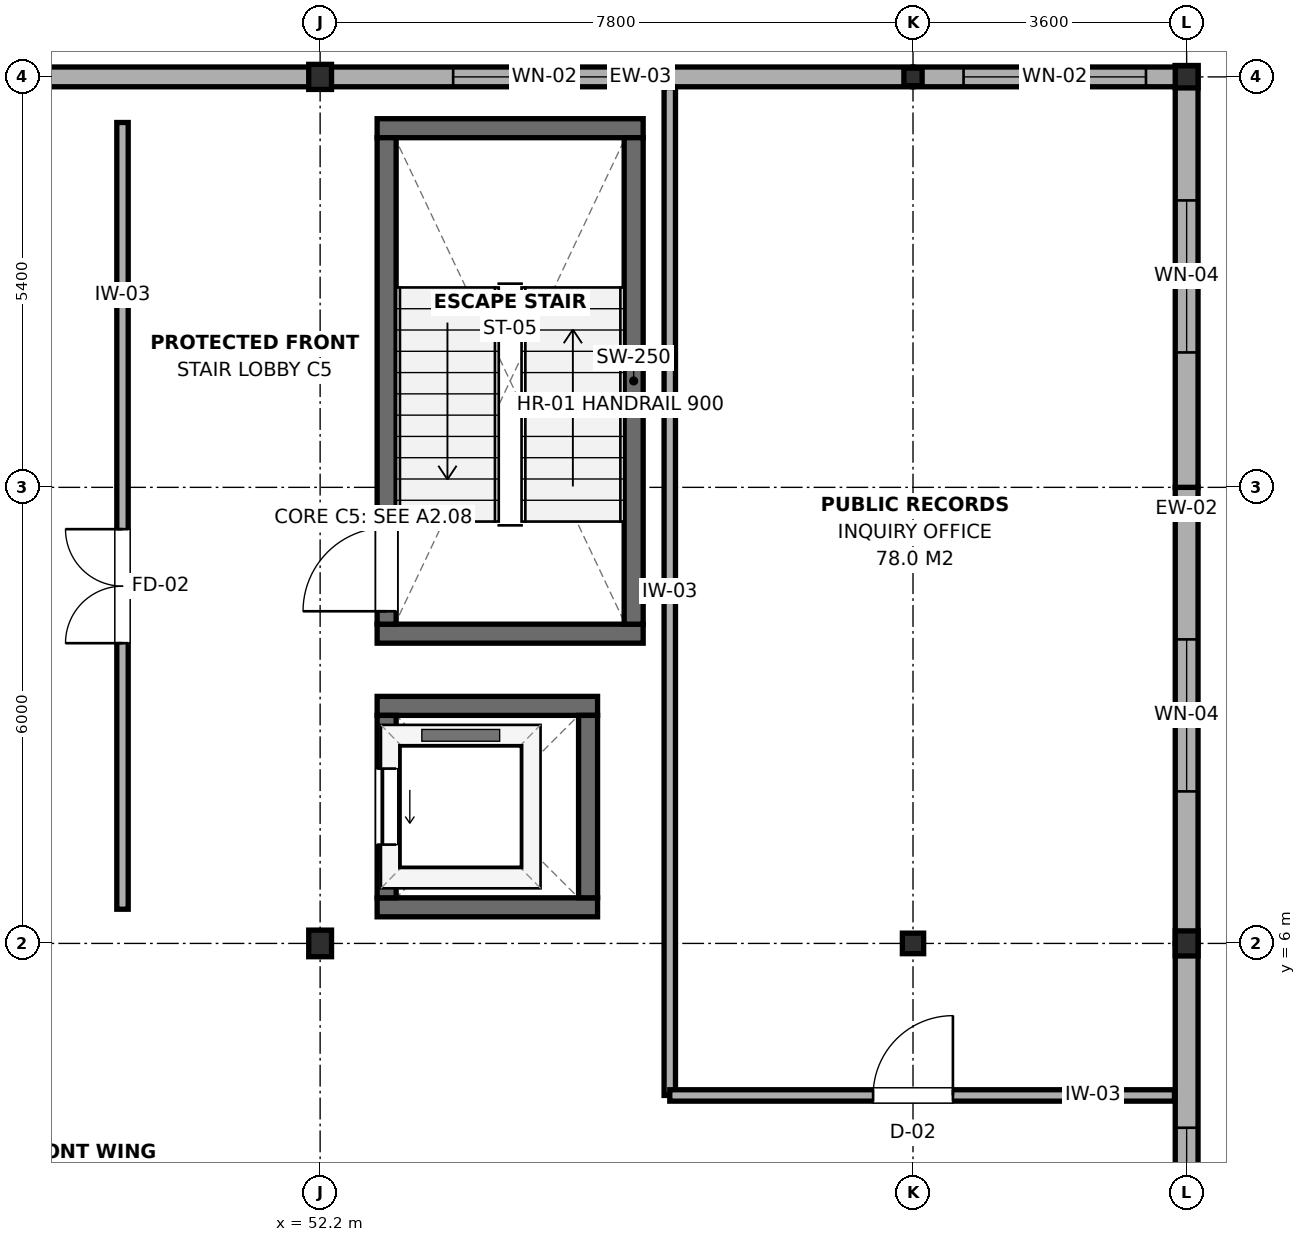
"""IFC4 building model, lengths in metres.
Left out: names, types, materials, properties, quantities, classifications, styles, units other than length and angle.
Written with IfcOpenShell. Run it as: python <this file> out.ifc"""

import sys

from ifc_helpers import new_model, si_unit, direction, frame, frame_2d, origin, origin_2d, place, context, subcontext, project, spatial, rectangle, i_section, extrude, element, fill, save


model = new_model("IFC4")
c1 = context("Model", 3, precision=1e-05, world=origin(), true_north=direction((0.0, 1.0)))
c2 = subcontext(c1, "Body", "Model", "MODEL_VIEW")
j1 = project(units=[si_unit("LENGTHUNIT", "METRE"), si_unit("PLANEANGLEUNIT", "RADIAN")], contexts=[c1])
p1 = place(None, origin())
s1 = spatial("IfcSite", under=j1, at=p1, CompositionType="ELEMENT")
p2 = place(p1, origin())
s2 = spatial("IfcBuilding", under=s1, at=p2, CompositionType="ELEMENT")
p3 = place(p2, frame((0.0, 0.0, 4.8)))
s3 = spatial("IfcBuildingStorey", under=s2, at=p3, CompositionType="ELEMENT", Elevation=4.8)
p4 = place(p3, frame((52.2, 6.0, 0.0), z_axis=(0.0, 0.0, 1.0), x_axis=(1.0, 0.0, 0.0)))
e1 = element("IfcColumn", 1, at=p4, inside=s3, PredefinedType="COLUMN", context=c2, shape_type="SweptSolid", body=[
    extrude(i_section(OverallWidth=0.3, OverallDepth=0.35, WebThickness=0.01, FlangeThickness=0.018, FilletRadius=0.027, at=origin_2d()), origin(), (0.0, 0.0, 1.0), 3.98),
])
p5 = place(p3, frame((52.2, 17.4, 0.0), z_axis=(0.0, 0.0, 1.0), x_axis=(1.0, 0.0, 0.0)))
e2 = element("IfcColumn", 2, at=p5, inside=s3, PredefinedType="COLUMN", context=c2, shape_type="SweptSolid", body=[
    extrude(i_section(OverallWidth=0.3, OverallDepth=0.33, WebThickness=0.01, FlangeThickness=0.017, FilletRadius=0.027, at=origin_2d()), origin(), (0.0, 0.0, 1.0), 3.98),
])
p6 = place(p3, frame((60.0, 6.0, 0.0), z_axis=(0.0, 0.0, 1.0), x_axis=(1.0, 0.0, 0.0)))
e3 = element("IfcColumn", 3, at=p6, inside=s3, PredefinedType="COLUMN", context=c2, shape_type="SweptSolid", body=[
    extrude(i_section(OverallWidth=0.28, OverallDepth=0.27, WebThickness=0.008, FlangeThickness=0.013, FilletRadius=0.024, at=origin_2d()), origin(), (0.0, 0.0, 1.0), 3.98),
])
p7 = place(p3, frame((60.0, 17.4, 0.0), z_axis=(0.0, 0.0, 1.0), x_axis=(1.0, 0.0, 0.0)))
e4 = element("IfcColumn", 4, at=p7, inside=s3, PredefinedType="COLUMN", context=c2, shape_type="SweptSolid", body=[
    extrude(i_section(OverallWidth=0.24, OverallDepth=0.23, WebThickness=0.008, FlangeThickness=0.012, FilletRadius=0.021, at=origin_2d()), origin(), (0.0, 0.0, 1.0), 3.98),
])
p8 = place(p3, frame((63.6, 6.0, 0.0), z_axis=(0.0, 0.0, 1.0), x_axis=(1.0, 0.0, 0.0)))
e5 = element("IfcColumn", 5, at=p8, inside=s3, PredefinedType="COLUMN", context=c2, shape_type="SweptSolid", body=[
    extrude(i_section(OverallWidth=0.3, OverallDepth=0.33, WebThickness=0.01, FlangeThickness=0.017, FilletRadius=0.027, at=origin_2d()), origin(), (0.0, 0.0, 1.0), 3.98),
])
p9 = place(p3, frame((63.6, 17.4, 0.0), z_axis=(0.0, 0.0, 1.0), x_axis=(1.0, 0.0, 0.0)))
e6 = element("IfcColumn", 6, at=p9, inside=s3, PredefinedType="COLUMN", context=c2, shape_type="SweptSolid", body=[
    extrude(i_section(OverallWidth=0.3, OverallDepth=0.29, WebThickness=0.009, FlangeThickness=0.014, FilletRadius=0.027, at=origin_2d()), origin(), (0.0, 0.0, 1.0), 3.98),
])
for number, where, z_axis, x_axis in (
    (7, (52.95, 10.075, 0.0), (0.0, 0.0, 1.0), (1.0, 0.0, 0.0)),
    (8, (52.95, 16.725, 0.0), (0.0, 0.0, 1.0), (1.0, 0.0, 0.0)),
):
    element("IfcWall", number, at=place(p3, frame(where, z_axis=z_axis, x_axis=x_axis)), inside=s3, PredefinedType="SHEAR", context=c2, shape_type="SweptSolid", body=[
        extrude(rectangle(XDim=3.5, YDim=0.25, at=frame_2d((1.75, 0.0))), origin(), (0.0, 0.0, 1.0), 3.98),
    ])
p10 = place(p3, frame((53.075, 10.2, 0.0), z_axis=(0.0, 0.0, 1.0), x_axis=(0.0, 1.0, 0.0)))
e9 = element("IfcWall", 9, at=p10, inside=s3, PredefinedType="SHEAR", context=c2, shape_type="SweptSolid", body=[
    extrude(rectangle(XDim=6.4, YDim=0.25, at=frame_2d((3.2, 0.0))), origin(), (0.0, 0.0, 1.0), 3.98),
])
p11 = place(p10, frame((0.17, 0.0, 0.0)))
e10 = element("IfcOpeningElement", 10, at=p11, cuts=e9, PredefinedType="OPENING", context=c2, shape_type="SweptSolid", body=[
    extrude(rectangle(XDim=1.1, YDim=2.15, at=frame_2d((0.55, 1.075))), frame((0.0, 0.14, 0.0), z_axis=(0.0, -1.0, 0.0), x_axis=(1.0, 0.0, 0.0)), (0.0, 0.0, 1.0), 0.28),
])
p12 = place(p3, frame((56.325, 10.2, 0.0), z_axis=(0.0, 0.0, 1.0), x_axis=(0.0, 1.0, 0.0)))
e11 = element("IfcWall", 11, at=p12, inside=s3, PredefinedType="SHEAR", context=c2, shape_type="SweptSolid", body=[
    extrude(rectangle(XDim=6.4, YDim=0.25, at=frame_2d((3.2, 0.0))), origin(), (0.0, 0.0, 1.0), 3.98),
])
for number, where, z_axis, x_axis in (
    (12, (52.95, 6.475, 0.0), (0.0, 0.0, 1.0), (1.0, 0.0, 0.0)),
    (13, (52.95, 9.125, 0.0), (0.0, 0.0, 1.0), (1.0, 0.0, 0.0)),
):
    element("IfcWall", number, at=place(p3, frame(where, z_axis=z_axis, x_axis=x_axis)), inside=s3, PredefinedType="SHEAR", context=c2, shape_type="SweptSolid", body=[
        extrude(rectangle(XDim=2.9, YDim=0.25, at=frame_2d((1.45, 0.0))), origin(), (0.0, 0.0, 1.0), 3.98),
    ])
p13 = place(p3, frame((53.075, 6.6, 0.0), z_axis=(0.0, 0.0, 1.0), x_axis=(0.0, 1.0, 0.0)))
e14 = element("IfcWall", 14, at=p13, inside=s3, PredefinedType="SHEAR", context=c2, shape_type="SweptSolid", body=[
    extrude(rectangle(XDim=2.4, YDim=0.25, at=frame_2d((1.2, 0.0))), origin(), (0.0, 0.0, 1.0), 3.98),
])
p14 = place(p13, frame((0.7, 0.0, 0.0)))
e15 = element("IfcOpeningElement", 15, at=p14, cuts=e14, PredefinedType="OPENING", context=c2, shape_type="SweptSolid", body=[
    extrude(rectangle(XDim=1.0, YDim=2.15, at=frame_2d((0.5, 1.075))), frame((0.0, 0.14, 0.0), z_axis=(0.0, -1.0, 0.0), x_axis=(1.0, 0.0, 0.0)), (0.0, 0.0, 1.0), 0.28),
])
p15 = place(p3, frame((55.725, 6.6, 0.0), z_axis=(0.0, 0.0, 1.0), x_axis=(0.0, 1.0, 0.0)))
e16 = element("IfcWall", 16, at=p15, inside=s3, PredefinedType="SHEAR", context=c2, shape_type="SweptSolid", body=[
    extrude(rectangle(XDim=2.4, YDim=0.25, at=frame_2d((1.2, 0.0))), origin(), (0.0, 0.0, 1.0), 3.98),
])
p16 = place(p3, frame((63.6, 1.05, 0.0), z_axis=(0.0, 0.0, 1.0), x_axis=(0.0, 1.0, 0.0)))
e17 = element("IfcWall", 17, at=p16, inside=s3, PredefinedType="SOLIDWALL", context=c2, shape_type="SweptSolid", body=[
    extrude(rectangle(XDim=4.95, YDim=0.3, at=frame_2d((2.475, 0.0))), origin(), (0.0, 0.0, 1.0), 3.385),
])
p17 = place(p16, frame((0.525, 0.0, 0.9)))
e18 = element("IfcOpeningElement", 18, at=p17, cuts=e17, PredefinedType="OPENING", context=c2, shape_type="SweptSolid", body=[
    extrude(rectangle(XDim=2.0, YDim=1.8, at=frame_2d((1.0, 0.9))), frame((0.0, 0.165, 0.0), z_axis=(0.0, -1.0, 0.0), x_axis=(1.0, 0.0, 0.0)), (0.0, 0.0, 1.0), 0.33),
])
p18 = place(p3, frame((63.6, 6.0, 0.0), z_axis=(0.0, 0.0, 1.0), x_axis=(0.0, 1.0, 0.0)))
e19 = element("IfcWall", 19, at=p18, inside=s3, PredefinedType="SOLIDWALL", context=c2, shape_type="SweptSolid", body=[
    extrude(rectangle(XDim=6.0, YDim=0.3, at=frame_2d((3.0, 0.0))), origin(), (0.0, 0.0, 1.0), 3.385),
])
p19 = place(p18, frame((2.0, 0.0, 0.9)))
e20 = element("IfcOpeningElement", 20, at=p19, cuts=e19, PredefinedType="OPENING", context=c2, shape_type="SweptSolid", body=[
    extrude(rectangle(XDim=2.0, YDim=1.8, at=frame_2d((1.0, 0.9))), frame((0.0, 0.165, 0.0), z_axis=(0.0, -1.0, 0.0), x_axis=(1.0, 0.0, 0.0)), (0.0, 0.0, 1.0), 0.33),
])
p20 = place(p3, frame((63.6, 12.0, 0.0), z_axis=(0.0, 0.0, 1.0), x_axis=(0.0, 1.0, 0.0)))
e21 = element("IfcWall", 21, at=p20, inside=s3, PredefinedType="SOLIDWALL", context=c2, shape_type="SweptSolid", body=[
    extrude(rectangle(XDim=5.55, YDim=0.3, at=frame_2d((2.775, 0.0))), origin(), (0.0, 0.0, 1.0), 3.385),
])
p21 = place(p20, frame((1.775, 0.0, 0.9)))
e22 = element("IfcOpeningElement", 22, at=p21, cuts=e21, PredefinedType="OPENING", context=c2, shape_type="SweptSolid", body=[
    extrude(rectangle(XDim=2.0, YDim=1.8, at=frame_2d((1.0, 0.9))), frame((0.0, 0.165, 0.0), z_axis=(0.0, -1.0, 0.0), x_axis=(1.0, 0.0, 0.0)), (0.0, 0.0, 1.0), 0.33),
])
p22 = place(p3, frame((46.2, 17.4, 0.0), z_axis=(0.0, 0.0, 1.0), x_axis=(1.0, 0.0, 0.0)))
e23 = element("IfcWall", 23, at=p22, inside=s3, PredefinedType="SOLIDWALL", context=c2, shape_type="SweptSolid", body=[
    extrude(rectangle(XDim=6.0, YDim=0.26, at=frame_2d((3.0, 0.0))), origin(), (0.0, 0.0, 1.0), 3.375),
])
p23 = place(p3, frame((52.2, 17.4, 0.0), z_axis=(0.0, 0.0, 1.0), x_axis=(1.0, 0.0, 0.0)))
e24 = element("IfcWall", 24, at=p23, inside=s3, PredefinedType="SOLIDWALL", context=c2, shape_type="SweptSolid", body=[
    extrude(rectangle(XDim=7.8, YDim=0.26, at=frame_2d((3.9, 0.0))), origin(), (0.0, 0.0, 1.0), 3.375),
])
p24 = place(p23, frame((1.75, 0.0, 0.9)))
e25 = element("IfcOpeningElement", 25, at=p24, cuts=e24, PredefinedType="OPENING", context=c2, shape_type="SweptSolid", body=[
    extrude(rectangle(XDim=2.4, YDim=2.1, at=frame_2d((1.2, 1.05))), frame((0.0, 0.145, 0.0), z_axis=(0.0, -1.0, 0.0), x_axis=(1.0, 0.0, 0.0)), (0.0, 0.0, 1.0), 0.29),
])
p25 = place(p3, frame((60.0, 17.4, 0.0), z_axis=(0.0, 0.0, 1.0), x_axis=(1.0, 0.0, 0.0)))
e26 = element("IfcWall", 26, at=p25, inside=s3, PredefinedType="SOLIDWALL", context=c2, shape_type="SweptSolid", body=[
    extrude(rectangle(XDim=3.73, YDim=0.26, at=frame_2d((1.865, 0.0))), origin(), (0.0, 0.0, 1.0), 3.375),
])
p26 = place(p25, frame((0.665, 0.0, 0.9)))
e27 = element("IfcOpeningElement", 27, at=p26, cuts=e26, PredefinedType="OPENING", context=c2, shape_type="SweptSolid", body=[
    extrude(rectangle(XDim=2.4, YDim=2.1, at=frame_2d((1.2, 1.05))), frame((0.0, 0.145, 0.0), z_axis=(0.0, -1.0, 0.0), x_axis=(1.0, 0.0, 0.0)), (0.0, 0.0, 1.0), 0.29),
])
p27 = place(p3, frame((56.8, 4.0, 0.0), z_axis=(0.0, 0.0, 1.0), x_axis=(0.0, 1.0, 0.0)))
e28 = element("IfcWall", 28, at=p27, inside=s3, PredefinedType="PARTITIONING", context=c2, shape_type="SweptSolid", body=[
    extrude(rectangle(XDim=13.26, YDim=0.15, at=frame_2d((6.63, 0.0))), origin(), (0.0, 0.0, 1.0), 3.375),
])
p28 = place(p3, frame((56.8, 4.0, 0.0), z_axis=(0.0, 0.0, 1.0), x_axis=(1.0, 0.0, 0.0)))
e29 = element("IfcWall", 29, at=p28, inside=s3, PredefinedType="PARTITIONING", context=c2, shape_type="SweptSolid", body=[
    extrude(rectangle(XDim=6.64, YDim=0.15, at=frame_2d((3.32, 0.0))), origin(), (0.0, 0.0, 1.0), 3.475),
])
p29 = place(p28, frame((2.675, 0.0, 0.0)))
e30 = element("IfcOpeningElement", 30, at=p29, cuts=e29, PredefinedType="OPENING", context=c2, shape_type="SweptSolid", body=[
    extrude(rectangle(XDim=1.05, YDim=2.15, at=frame_2d((0.525, 1.075))), frame((0.0, 0.09, 0.0), z_axis=(0.0, -1.0, 0.0), x_axis=(1.0, 0.0, 0.0)), (0.0, 0.0, 1.0), 0.18),
])
p30 = place(p3, frame((49.6, 6.45, 0.0), z_axis=(0.0, 0.0, 1.0), x_axis=(0.0, 1.0, 0.0)))
e31 = element("IfcWall", 31, at=p30, inside=s3, PredefinedType="PARTITIONING", context=c2, shape_type="SweptSolid", body=[
    extrude(rectangle(XDim=10.35, YDim=0.15, at=frame_2d((5.175, 0.0))), origin(), (0.0, 0.0, 1.0), 3.975),
])
p31 = place(p30, frame((3.5, 0.0, 0.0)))
e32 = element("IfcOpeningElement", 32, at=p31, cuts=e31, PredefinedType="OPENING", context=c2, shape_type="SweptSolid", body=[
    extrude(rectangle(XDim=1.5, YDim=2.15, at=frame_2d((0.75, 1.075))), frame((0.0, 0.09, 0.0), z_axis=(0.0, -1.0, 0.0), x_axis=(1.0, 0.0, 0.0)), (0.0, 0.0, 1.0), 0.18),
])
p32 = place(p17, origin())
e33 = element("IfcWindow", 33, at=p32, inside=s3, PartitioningType="SINGLE_PANEL", PredefinedType="WINDOW", context=c2, shape_type="SweptSolid", body=[
    extrude(rectangle(XDim=2.0, YDim=1.8, at=frame_2d((1.0, 0.9))), frame((0.0, 0.03, 0.0), z_axis=(0.0, -1.0, 0.0), x_axis=(1.0, 0.0, 0.0)), (0.0, 0.0, 1.0), 0.06),
])
fill(e18, e33)
p33 = place(p19, origin())
e34 = element("IfcWindow", 34, at=p33, inside=s3, PartitioningType="SINGLE_PANEL", PredefinedType="WINDOW", context=c2, shape_type="SweptSolid", body=[
    extrude(rectangle(XDim=2.0, YDim=1.8, at=frame_2d((1.0, 0.9))), frame((0.0, 0.03, 0.0), z_axis=(0.0, -1.0, 0.0), x_axis=(1.0, 0.0, 0.0)), (0.0, 0.0, 1.0), 0.06),
])
fill(e20, e34)
p34 = place(p21, origin())
e35 = element("IfcWindow", 35, at=p34, inside=s3, PartitioningType="SINGLE_PANEL", PredefinedType="WINDOW", context=c2, shape_type="SweptSolid", body=[
    extrude(rectangle(XDim=2.0, YDim=1.8, at=frame_2d((1.0, 0.9))), frame((0.0, 0.03, 0.0), z_axis=(0.0, -1.0, 0.0), x_axis=(1.0, 0.0, 0.0)), (0.0, 0.0, 1.0), 0.06),
])
fill(e22, e35)
p35 = place(p24, origin())
e36 = element("IfcWindow", 36, at=p35, inside=s3, PartitioningType="SINGLE_PANEL", PredefinedType="WINDOW", context=c2, shape_type="SweptSolid", body=[
    extrude(rectangle(XDim=2.4, YDim=2.1, at=frame_2d((1.2, 1.05))), frame((0.0, 0.03, 0.0), z_axis=(0.0, -1.0, 0.0), x_axis=(1.0, 0.0, 0.0)), (0.0, 0.0, 1.0), 0.06),
])
fill(e25, e36)
p36 = place(p26, origin())
e37 = element("IfcWindow", 37, at=p36, inside=s3, PartitioningType="SINGLE_PANEL", PredefinedType="WINDOW", context=c2, shape_type="SweptSolid", body=[
    extrude(rectangle(XDim=2.4, YDim=2.1, at=frame_2d((1.2, 1.05))), frame((0.0, 0.03, 0.0), z_axis=(0.0, -1.0, 0.0), x_axis=(1.0, 0.0, 0.0)), (0.0, 0.0, 1.0), 0.06),
])
fill(e27, e37)
p37 = place(p11, origin())
e38 = element("IfcDoor", 38, at=p37, inside=s3, OperationType="SINGLE_SWING_LEFT", PredefinedType="DOOR", context=c2, shape_type="SweptSolid", body=[
    extrude(rectangle(XDim=1.1, YDim=2.15, at=frame_2d((0.55, 1.075))), frame((0.0, 0.025, 0.0), z_axis=(0.0, -1.0, 0.0), x_axis=(1.0, 0.0, 0.0)), (0.0, 0.0, 1.0), 0.05),
])
fill(e10, e38)
p38 = place(p14, origin())
e39 = element("IfcDoor", 39, at=p38, inside=s3, OperationType="SLIDING_TO_LEFT", PredefinedType="DOOR", context=c2, shape_type="SweptSolid", body=[
    extrude(rectangle(XDim=1.0, YDim=2.15, at=frame_2d((0.5, 1.075))), frame((0.0, 0.025, 0.0), z_axis=(0.0, -1.0, 0.0), x_axis=(1.0, 0.0, 0.0)), (0.0, 0.0, 1.0), 0.05),
])
fill(e15, e39)
p39 = place(p29, origin())
e40 = element("IfcDoor", 40, at=p39, inside=s3, OperationType="SINGLE_SWING_RIGHT", PredefinedType="DOOR", context=c2, shape_type="SweptSolid", body=[
    extrude(rectangle(XDim=1.05, YDim=2.15, at=frame_2d((0.525, 1.075))), frame((0.0, 0.025, 0.0), z_axis=(0.0, -1.0, 0.0), x_axis=(1.0, 0.0, 0.0)), (0.0, 0.0, 1.0), 0.05),
])
fill(e30, e40)
p40 = place(p31, origin())
e41 = element("IfcDoor", 41, at=p40, inside=s3, OperationType="DOUBLE_DOOR_SINGLE_SWING", PredefinedType="DOOR", context=c2, shape_type="SweptSolid", body=[
    extrude(rectangle(XDim=1.5, YDim=2.15, at=frame_2d((0.75, 1.075))), frame((0.0, 0.025, 0.0), z_axis=(0.0, -1.0, 0.0), x_axis=(1.0, 0.0, 0.0)), (0.0, 0.0, 1.0), 0.05),
])
fill(e32, e41)
save(model, sys.argv[1])
